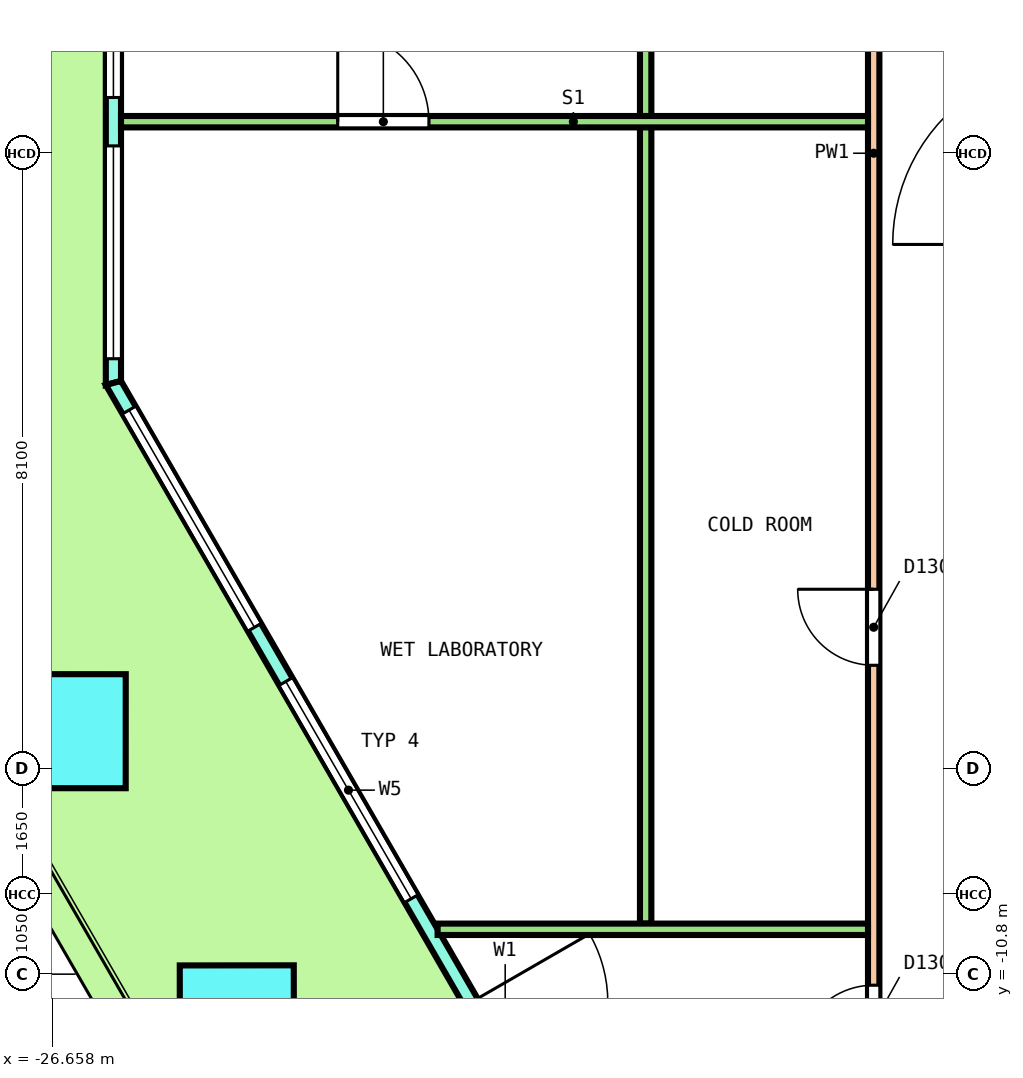
"""IFC4 building model, lengths in metres.
Left out: names, types, materials, properties, quantities, classifications, styles, units other than length and angle.
Written with IfcOpenShell. Run it as: python <this file> out.ifc"""

import sys

from ifc_helpers import new_model, si_unit, direction, frame, frame_2d, origin, origin_2d, place, context, subcontext, project, spatial, polyline, rectangle, outline, extrude, element, fill, save


model = new_model("IFC4")
c1 = context("Model", 3, precision=1e-05, world=origin(), true_north=direction((0.0, 1.0)))
c2 = subcontext(c1, "Body", "Model", "MODEL_VIEW")
j1 = project(units=[si_unit("LENGTHUNIT", "METRE"), si_unit("PLANEANGLEUNIT", "RADIAN")], contexts=[c1])
p1 = place(None, origin())
s1 = spatial("IfcSite", under=j1, at=p1, CompositionType="ELEMENT")
p2 = place(p1, origin())
s2 = spatial("IfcBuilding", under=s1, at=p2, CompositionType="ELEMENT")
p3 = place(p2, frame((0.0, 0.0, 27.8)))
s3 = spatial("IfcBuildingStorey", under=s2, at=p3, CompositionType="ELEMENT", Elevation=27.8)
p4 = place(p3, frame((-26.44, -7.604, 0.0), z_axis=(-0.010908266268, 0.018803199313, 0.999763696792), x_axis=(0.501388074159, -0.864949390756, 0.021738227219)))
e1 = element("IfcColumn", 1, at=p4, inside=s3, PredefinedType="COLUMN", context=c2, shape_type="SweptSolid", body=[
    extrude(rectangle(XDim=1.5, YDim=1.5, at=origin_2d()), origin(), (0.0, 0.0, 1.0), 4.051),
])
p5 = place(p3, frame((-24.229, -11.435, 0.0), z_axis=(-0.003616759812, 0.006269050341, 0.999973808685), x_axis=(0.500530036588, -0.865688916746, 0.00723753388)))
e2 = element("IfcColumn", 2, at=p5, inside=s3, PredefinedType="COLUMN", context=c2, shape_type="SweptSolid", body=[
    extrude(rectangle(XDim=1.5, YDim=1.5, at=origin_2d()), origin(), (0.0, 0.0, 1.0), 4.05),
])
p6 = place(p3, frame((-25.852, 3.852, 0.0), z_axis=(0.0, 0.0, 1.0), x_axis=(0.0, -1.0, 0.0)))
e3 = element("IfcWall", 3, at=p6, inside=s3, PredefinedType="SOLIDWALL", context=c2, shape_type="SweptSolid", body=[
    extrude(outline(polyline([(-0.027, -0.1), (1.128, -0.1), (2.282, -0.1), (3.437, -0.1), (4.592, -0.1), (5.747, -0.1), (6.901, -0.1), (6.848, 0.1), (5.711, 0.1), (4.574, 0.1), (3.437, 0.1), (2.301, 0.1), (1.164, 0.1), (0.027, 0.1), (-0.027, -0.1)])), origin(), (0.0, 0.0, 1.0), 4.1),
])
p7 = place(p6, frame((0.319, 0.0, 0.1)))
e4 = element("IfcOpeningElement", 4, at=p7, cuts=e3, PredefinedType="OPENING", context=c2, shape_type="SweptSolid", body=[
    extrude(rectangle(XDim=2.8, YDim=2.9, at=frame_2d((1.4, 1.45))), frame((0.0, 0.11, 0.0), z_axis=(0.0, -1.0, 0.0), x_axis=(1.0, 0.0, 0.0)), (0.0, 0.0, 1.0), 0.22),
])
p8 = place(p6, frame((3.756, 0.0, 0.1)))
e5 = element("IfcOpeningElement", 5, at=p8, cuts=e3, PredefinedType="OPENING", context=c2, shape_type="SweptSolid", body=[
    extrude(rectangle(XDim=2.8, YDim=2.9, at=frame_2d((1.4, 1.45))), frame((0.0, 0.11, 0.0), z_axis=(0.0, -1.0, 0.0), x_axis=(1.0, 0.0, 0.0)), (0.0, 0.0, 1.0), 0.22),
])
p9 = place(p3, frame((-25.852, -3.022, 0.0), z_axis=(0.0, 0.0, 1.0), x_axis=(0.500000580948, -0.866025068374, 0.0)))
e6 = element("IfcWall", 6, at=p9, inside=s3, PredefinedType="SOLIDWALL", context=c2, shape_type="SweptSolid", body=[
    extrude(outline(polyline([(-0.027, -0.1), (1.007, -0.1), (2.04, -0.1), (3.074, -0.1), (4.107, -0.1), (5.141, -0.1), (6.174, -0.1), (7.208, -0.1), (8.241, -0.1), (9.275, -0.1), (10.309, -0.1), (11.342, -0.1), (12.376, -0.1), (13.409, -0.1), (14.443, -0.1), (15.476, -0.1), (16.51, -0.1), (17.543, -0.1), (18.577, -0.1), (19.611, -0.1), (20.644, -0.1), (20.59, 0.1), (19.562, 0.1), (18.534, 0.1), (17.506, 0.1), (16.478, 0.1), (15.449, 0.1), (14.421, 0.1), (13.393, 0.1), (12.365, 0.1), (11.337, 0.1), (10.309, 0.1), (9.281, 0.1), (8.252, 0.1), (7.224, 0.1), (6.196, 0.1), (5.168, 0.1), (4.14, 0.1), (3.111, 0.1), (2.083, 0.1), (1.055, 0.1), (0.027, 0.1), (-0.027, -0.1)])), origin(), (0.0, 0.0, 1.0), 4.1),
])
p10 = place(p9, frame((0.412, 0.0, 0.1)))
e7 = element("IfcOpeningElement", 7, at=p10, cuts=e6, PredefinedType="OPENING", context=c2, shape_type="SweptSolid", body=[
    extrude(rectangle(XDim=3.3, YDim=2.9, at=frame_2d((1.65, 1.45))), frame((0.0, 0.11, 0.0), z_axis=(0.0, -1.0, 0.0), x_axis=(1.0, 0.0, 0.0)), (0.0, 0.0, 1.0), 0.22),
])
p11 = place(p9, frame((4.535, 0.0, 0.1)))
e8 = element("IfcOpeningElement", 8, at=p11, cuts=e6, PredefinedType="OPENING", context=c2, shape_type="SweptSolid", body=[
    extrude(rectangle(XDim=3.3, YDim=2.9, at=frame_2d((1.65, 1.45))), frame((0.0, 0.11, 0.0), z_axis=(0.0, -1.0, 0.0), x_axis=(1.0, 0.0, 0.0)), (0.0, 0.0, 1.0), 0.22),
])
p12 = place(p9, frame((9.409, 0.0, 0.0)))
e9 = element("IfcOpeningElement", 9, at=p12, cuts=e6, PredefinedType="OPENING", context=c2, shape_type="SweptSolid", body=[
    extrude(rectangle(XDim=1.8, YDim=2.4, at=frame_2d((0.9, 1.2))), frame((0.0, 0.11, 0.0), z_axis=(0.0, -1.0, 0.0), x_axis=(1.0, 0.0, 0.0)), (0.0, 0.0, 1.0), 0.22),
])
p13 = place(p9, frame((9.409, 0.0, 2.55)))
e10 = element("IfcOpeningElement", 10, at=p13, cuts=e6, PredefinedType="OPENING", context=c2, shape_type="SweptSolid", body=[
    extrude(rectangle(XDim=1.8, YDim=0.45, at=frame_2d((0.9, 0.225))), frame((0.0, 0.11, 0.0), z_axis=(0.0, -1.0, 0.0), x_axis=(1.0, 0.0, 0.0)), (0.0, 0.0, 1.0), 0.22),
])
p14 = place(p9, frame((12.782, 0.0, 0.1)))
e11 = element("IfcOpeningElement", 11, at=p14, cuts=e6, PredefinedType="OPENING", context=c2, shape_type="SweptSolid", body=[
    extrude(rectangle(XDim=3.3, YDim=2.9, at=frame_2d((1.65, 1.45))), frame((0.0, 0.11, 0.0), z_axis=(0.0, -1.0, 0.0), x_axis=(1.0, 0.0, 0.0)), (0.0, 0.0, 1.0), 0.22),
])
p15 = place(p9, frame((16.906, 0.0, 0.1)))
e12 = element("IfcOpeningElement", 12, at=p15, cuts=e6, PredefinedType="OPENING", context=c2, shape_type="SweptSolid", body=[
    extrude(rectangle(XDim=3.3, YDim=2.9, at=frame_2d((1.65, 1.45))), frame((0.0, 0.11, 0.0), z_axis=(0.0, -1.0, 0.0), x_axis=(1.0, 0.0, 0.0)), (0.0, 0.0, 1.0), 0.22),
])
p16 = place(p3, frame((-15.85, -13.375, 0.0), z_axis=(0.0, 0.0, 1.0), x_axis=(0.0, 1.0, 0.0)))
e13 = element("IfcWall", 13, at=p16, inside=s3, PredefinedType="PARTITIONING", context=c2, shape_type="SweptSolid", body=[
    extrude(rectangle(XDim=26.75, YDim=0.15, at=frame_2d((13.375, 0.0))), origin(), (0.0, 0.0, 1.0), 3.05),
])
p17 = place(p16, frame((24.569, 0.0, 0.0)))
e14 = element("IfcOpeningElement", 14, at=p17, cuts=e13, PredefinedType="OPENING", context=c2, shape_type="SweptSolid", body=[
    extrude(rectangle(XDim=1.0, YDim=2.1, at=frame_2d((0.5, 1.05))), frame((0.0, 0.085, 0.0), z_axis=(0.0, -1.0, 0.0), x_axis=(1.0, 0.0, 0.0)), (0.0, 0.0, 1.0), 0.17),
])
p18 = place(p16, frame((16.247, 0.0, 0.0)))
e15 = element("IfcOpeningElement", 15, at=p18, cuts=e13, PredefinedType="OPENING", context=c2, shape_type="SweptSolid", body=[
    extrude(rectangle(XDim=1.0, YDim=2.1, at=frame_2d((0.5, 1.05))), frame((0.0, 0.085, 0.0), z_axis=(0.0, -1.0, 0.0), x_axis=(1.0, 0.0, 0.0)), (0.0, 0.0, 1.0), 0.17),
])
p19 = place(p16, frame((6.639, 0.0, 0.0)))
e16 = element("IfcOpeningElement", 16, at=p19, cuts=e13, PredefinedType="OPENING", context=c2, shape_type="SweptSolid", body=[
    extrude(rectangle(XDim=1.0, YDim=2.1, at=frame_2d((0.5, 1.05))), frame((0.0, 0.085, 0.0), z_axis=(0.0, -1.0, 0.0), x_axis=(1.0, 0.0, 0.0)), (0.0, 0.0, 1.0), 0.17),
])
p20 = place(p16, frame((1.43, 0.0, 0.0)))
e17 = element("IfcOpeningElement", 17, at=p20, cuts=e13, PredefinedType="OPENING", context=c2, shape_type="SweptSolid", body=[
    extrude(rectangle(XDim=1.0, YDim=2.1, at=frame_2d((0.5, 1.05))), frame((0.0, 0.085, 0.0), z_axis=(0.0, -1.0, 0.0), x_axis=(1.0, 0.0, 0.0)), (0.0, 0.0, 1.0), 0.17),
])
p21 = place(p3, frame((-18.85, -10.135, 0.0), z_axis=(0.0, 0.0, 1.0), x_axis=(0.0, 1.0, 0.0)))
e18 = element("IfcWall", 18, at=p21, inside=s3, PredefinedType="PARTITIONING", context=c2, shape_type="SweptSolid", body=[
    extrude(rectangle(XDim=20.602, YDim=0.15, at=frame_2d((10.301, 0.0))), origin(), (0.0, 0.0, 1.0), 3.05),
])
p22 = place(p21, frame((17.07, 0.0, 0.0)))
e19 = element("IfcOpeningElement", 19, at=p22, cuts=e18, PredefinedType="OPENING", context=c2, shape_type="SweptSolid", body=[
    extrude(rectangle(XDim=1.2, YDim=2.1, at=frame_2d((0.6, 1.05))), frame((0.0, 0.085, 0.0), z_axis=(0.0, -1.0, 0.0), x_axis=(1.0, 0.0, 0.0)), (0.0, 0.0, 1.0), 0.17),
])
p23 = place(p3, frame((-25.752, 0.415, 0.0), z_axis=(0.0, 0.0, 1.0), x_axis=(1.0, 0.0, 0.0)))
e20 = element("IfcWall", 20, at=p23, inside=s3, PredefinedType="PARTITIONING", context=c2, shape_type="SweptSolid", body=[
    extrude(rectangle(XDim=9.827, YDim=0.15, at=frame_2d((4.914, 0.0))), origin(), (0.0, 0.0, 1.0), 3.05),
])
p24 = place(p23, frame((2.851, 0.0, 0.0)))
e21 = element("IfcOpeningElement", 21, at=p24, cuts=e20, PredefinedType="OPENING", context=c2, shape_type="SweptSolid", body=[
    extrude(rectangle(XDim=1.2, YDim=2.1, at=frame_2d((0.6, 1.05))), frame((0.0, 0.085, 0.0), z_axis=(0.0, -1.0, 0.0), x_axis=(1.0, 0.0, 0.0)), (0.0, 0.0, 1.0), 0.17),
])
p25 = place(p3, frame((-21.587, -10.21, 0.0), z_axis=(0.0, 0.0, 1.0), x_axis=(1.0, 0.0, 0.0)))
e22 = element("IfcWall", 22, at=p25, inside=s3, PredefinedType="PARTITIONING", context=c2, shape_type="SweptSolid", body=[
    extrude(rectangle(XDim=5.662, YDim=0.15, at=frame_2d((2.831, 0.0))), origin(), (0.0, 0.0, 1.0), 3.05),
])
p26 = place(p7, origin())
e23 = element("IfcWindow", 23, at=p26, inside=s3, PartitioningType="SINGLE_PANEL", PredefinedType="WINDOW", context=c2, shape_type="SweptSolid", body=[
    extrude(rectangle(XDim=2.8, YDim=2.9, at=frame_2d((1.4, 1.45))), frame((0.0, 0.03, 0.0), z_axis=(0.0, -1.0, 0.0), x_axis=(1.0, 0.0, 0.0)), (0.0, 0.0, 1.0), 0.06),
])
fill(e4, e23)
p27 = place(p8, origin())
e24 = element("IfcWindow", 24, at=p27, inside=s3, PartitioningType="SINGLE_PANEL", PredefinedType="WINDOW", context=c2, shape_type="SweptSolid", body=[
    extrude(rectangle(XDim=2.8, YDim=2.9, at=frame_2d((1.4, 1.45))), frame((0.0, 0.03, 0.0), z_axis=(0.0, -1.0, 0.0), x_axis=(1.0, 0.0, 0.0)), (0.0, 0.0, 1.0), 0.06),
])
fill(e5, e24)
p28 = place(p10, origin())
e25 = element("IfcWindow", 25, at=p28, inside=s3, PartitioningType="SINGLE_PANEL", PredefinedType="WINDOW", context=c2, shape_type="SweptSolid", body=[
    extrude(rectangle(XDim=3.3, YDim=2.9, at=frame_2d((1.65, 1.45))), frame((0.0, 0.03, 0.0), z_axis=(0.0, -1.0, 0.0), x_axis=(1.0, 0.0, 0.0)), (0.0, 0.0, 1.0), 0.06),
])
fill(e7, e25)
p29 = place(p11, origin())
e26 = element("IfcWindow", 26, at=p29, inside=s3, PartitioningType="SINGLE_PANEL", PredefinedType="WINDOW", context=c2, shape_type="SweptSolid", body=[
    extrude(rectangle(XDim=3.3, YDim=2.9, at=frame_2d((1.65, 1.45))), frame((0.0, 0.03, 0.0), z_axis=(0.0, -1.0, 0.0), x_axis=(1.0, 0.0, 0.0)), (0.0, 0.0, 1.0), 0.06),
])
fill(e8, e26)
p30 = place(p24, origin())
e27 = element("IfcDoor", 27, at=p30, inside=s3, OperationType="DOUBLE_DOOR_SINGLE_SWING", PredefinedType="DOOR", context=c2, shape_type="SweptSolid", body=[
    extrude(rectangle(XDim=1.2, YDim=2.1, at=frame_2d((0.6, 1.05))), frame((0.0, 0.025, 0.0), z_axis=(0.0, -1.0, 0.0), x_axis=(1.0, 0.0, 0.0)), (0.0, 0.0, 1.0), 0.05),
])
fill(e21, e27)
p31 = place(p19, origin())
e28 = element("IfcDoor", 28, at=p31, inside=s3, OperationType="SINGLE_SWING_LEFT", PredefinedType="DOOR", context=c2, shape_type="SweptSolid", body=[
    extrude(rectangle(XDim=1.0, YDim=2.1, at=frame_2d((0.5, 1.05))), frame((0.0, 0.025, 0.0), z_axis=(0.0, -1.0, 0.0), x_axis=(1.0, 0.0, 0.0)), (0.0, 0.0, 1.0), 0.05),
])
fill(e16, e28)
p32 = place(p20, origin())
e29 = element("IfcDoor", 29, at=p32, inside=s3, OperationType="SINGLE_SWING_RIGHT", PredefinedType="DOOR", context=c2, shape_type="SweptSolid", body=[
    extrude(rectangle(XDim=1.0, YDim=2.1, at=frame_2d((0.5, 1.05))), frame((0.0, 0.025, 0.0), z_axis=(0.0, -1.0, 0.0), x_axis=(1.0, 0.0, 0.0)), (0.0, 0.0, 1.0), 0.05),
])
fill(e17, e29)
save(model, sys.argv[1])
